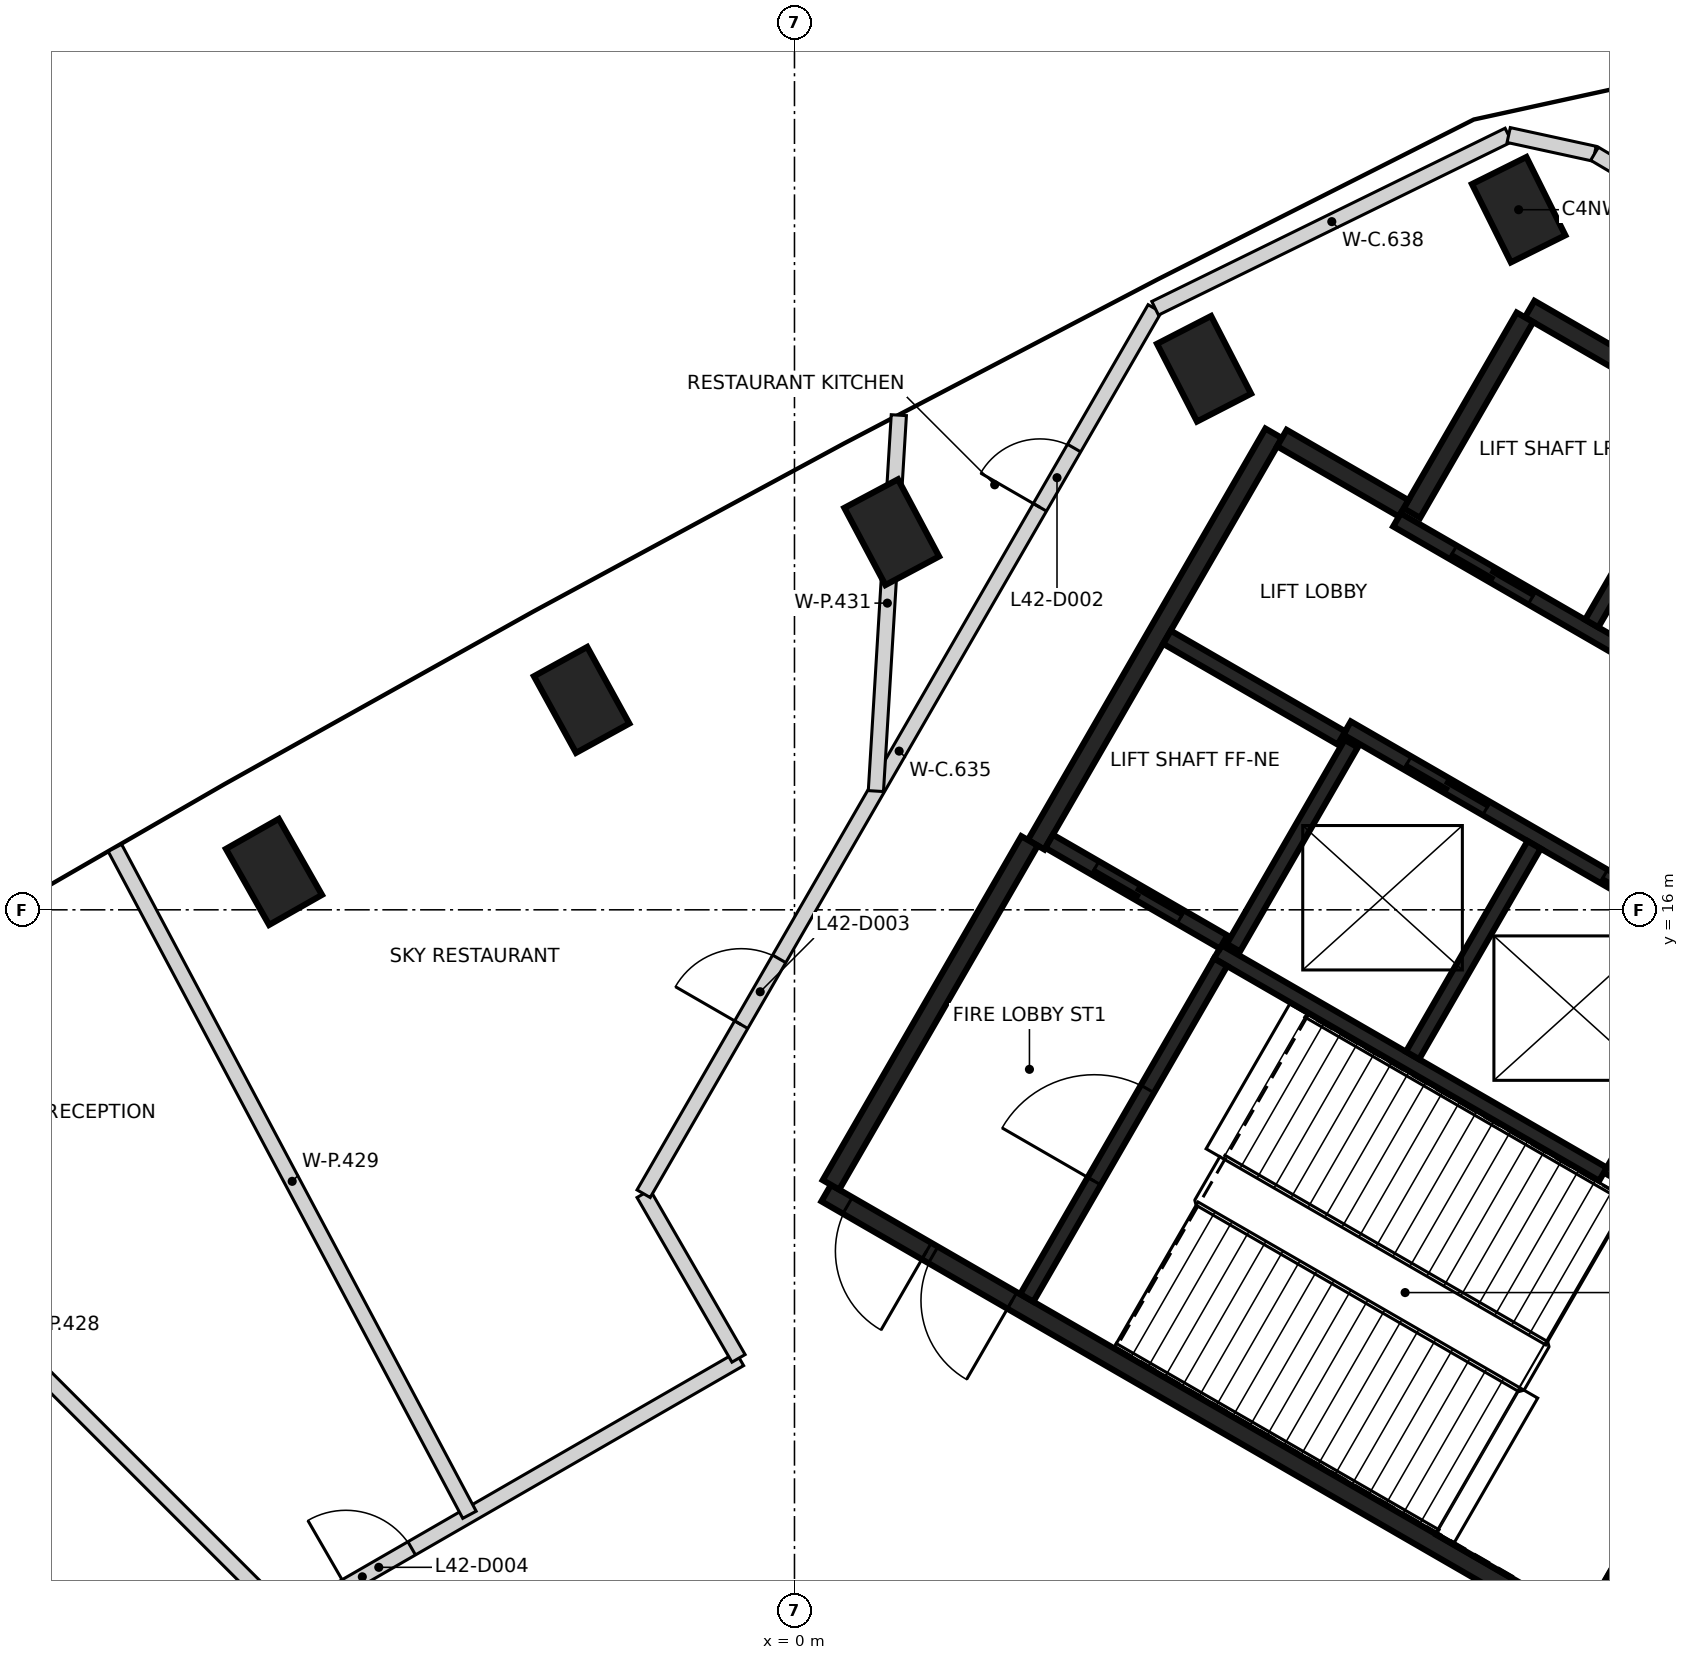
"""IFC4 building model, lengths in metres.
Left out: names, types, materials, properties, quantities, classifications, styles, units other than length and angle.
Written with IfcOpenShell. Run it as: python <this file> out.ifc"""

import sys

from ifc_helpers import new_model, si_unit, direction, frame, frame_2d, origin, origin_2d, place, context, subcontext, project, spatial, rectangle, extrude, element, fill, save


model = new_model("IFC4")
c1 = context("Model", 3, precision=1e-05, world=origin(), true_north=direction((0.0, 1.0)))
c2 = subcontext(c1, "Body", "Model", "MODEL_VIEW")
j1 = project(units=[si_unit("LENGTHUNIT", "METRE"), si_unit("PLANEANGLEUNIT", "RADIAN")], contexts=[c1])
p1 = place(None, origin())
s1 = spatial("IfcSite", under=j1, at=p1, CompositionType="ELEMENT")
p2 = place(p1, origin())
s2 = spatial("IfcBuilding", under=s1, at=p2, CompositionType="ELEMENT")
p3 = place(p2, frame((0.0, 0.0, 169.6)))
s3 = spatial("IfcBuildingStorey", under=s2, at=p3, CompositionType="ELEMENT", Elevation=169.6)
for number, where, z_axis, x_axis in (
    (1, (9.527, 25.211, -0.35), (0.0, 0.0, 1.0), (-0.445, 0.895, 0.0)),
    (2, (5.388, 23.118, -0.35), (0.0, 0.0, 1.0), (-0.458, 0.889, 0.0)),
    (3, (1.279, 20.968, -0.35), (0.0, 0.0, 1.0), (-0.47, 0.883, 0.0)),
    (4, (-2.8, 18.762, -0.35), (0.0, 0.0, 1.0), (-0.482, 0.876, 0.0)),
    (5, (-6.848, 16.499, -0.35), (0.0, 0.0, 1.0), (-0.494, 0.87, 0.0)),
):
    element("IfcColumn", number, at=place(p3, frame(where, z_axis=z_axis, x_axis=x_axis)), inside=s3, PredefinedType="COLUMN", context=c2, shape_type="SweptSolid", body=[
        extrude(rectangle(XDim=1.15, YDim=0.8, at=origin_2d()), origin(), (0.0, 0.0, 1.0), 6.0),
    ])
p4 = place(p3, frame((10.42, 6.498, 0.0), z_axis=(0.0, 0.0, 1.0), x_axis=(-0.866021906294, 0.500006057782, 0.0)))
e6 = element("IfcWall", 6, at=p4, inside=s3, PredefinedType="SHEAR", context=c2, shape_type="SweptSolid", body=[
    extrude(rectangle(XDim=11.55, YDim=0.25, at=frame_2d((5.775, 0.0))), origin(), (0.0, 0.0, 1.0), 5.65),
])
p5 = place(p4, frame((10.025, 0.0, 0.0)))
e7 = element("IfcOpeningElement", 7, at=p5, cuts=e6, PredefinedType="OPENING", context=c2, shape_type="SweptSolid", body=[
    extrude(rectangle(XDim=1.2, YDim=2.1, at=frame_2d((0.6, 1.05))), frame((0.0, 0.135, 0.0), z_axis=(0.0, -1.0, 0.0), x_axis=(1.0, 0.0, 0.0)), (0.0, 0.0, 1.0), 0.27),
])
p6 = place(p4, frame((8.725, 0.0, 0.0)))
e8 = element("IfcOpeningElement", 8, at=p6, cuts=e6, PredefinedType="OPENING", context=c2, shape_type="SweptSolid", body=[
    extrude(rectangle(XDim=1.2, YDim=2.1, at=frame_2d((0.6, 1.05))), frame((0.0, 0.135, 0.0), z_axis=(0.0, -1.0, 0.0), x_axis=(1.0, 0.0, 0.0)), (0.0, 0.0, 1.0), 0.27),
])
p7 = place(p3, frame((3.179, 16.856, 0.0), z_axis=(0.0, 0.0, 1.0), x_axis=(0.500004234368, 0.866022959057, 0.0)))
e9 = element("IfcWall", 9, at=p7, inside=s3, PredefinedType="SHEAR", context=c2, shape_type="SweptSolid", body=[
    extrude(rectangle(XDim=6.25, YDim=0.25, at=frame_2d((3.125, 0.0))), origin(), (0.0, 0.0, 1.0), 5.65),
])
p8 = place(p3, frame((9.673, 23.903, 0.0), z_axis=(0.0, 0.0, 1.0), x_axis=(0.86603616409, -0.499981362141, 0.0)))
e10 = element("IfcWall", 10, at=p8, inside=s3, PredefinedType="SHEAR", context=c2, shape_type="SweptSolid", body=[
    extrude(rectangle(XDim=5.85, YDim=0.25, at=frame_2d((2.925, 0.0))), origin(), (0.0, 0.0, 1.0), 5.65),
])
p9 = place(p3, frame((0.48, 12.381, 0.0), z_axis=(0.0, 0.0, 1.0), x_axis=(0.49999885962, 0.866026062182, 0.0)))
e11 = element("IfcWall", 11, at=p9, inside=s3, PredefinedType="SHEAR", context=c2, shape_type="SweptSolid", body=[
    extrude(rectangle(XDim=5.225, YDim=0.25, at=frame_2d((2.612, 0.0))), origin(), (0.0, 0.0, 1.0), 5.65),
])
p10 = place(p3, frame((13.238, 11.378, 0.0), z_axis=(0.0, 0.0, 1.0), x_axis=(-0.500008851346, -0.866020293397, 0.0)))
e12 = element("IfcWall", 12, at=p10, inside=s3, PredefinedType="SHEAR", context=c2, shape_type="SweptSolid", body=[
    extrude(rectangle(XDim=5.51, YDim=0.25, at=frame_2d((2.755, 0.0))), origin(), (0.0, 0.0, 1.0), 5.65),
])
p11 = place(p3, frame((12.357, 15.252, 0.0), z_axis=(0.0, 0.0, 1.0), x_axis=(-0.500028443584, -0.866008981251, 0.0)))
e13 = element("IfcWall", 13, at=p11, inside=s3, PredefinedType="SHEAR", context=c2, shape_type="SweptSolid", body=[
    extrude(rectangle(XDim=3.2, YDim=0.25, at=frame_2d((1.6, 0.0))), origin(), (0.0, 0.0, 1.0), 5.65),
])
p12 = place(p3, frame((8.123, 21.219, 0.0), z_axis=(0.0, 0.0, 1.0), x_axis=(0.499987686533, 0.866032512851, 0.0)))
e14 = element("IfcWall", 14, at=p12, inside=s3, PredefinedType="SHEAR", context=c2, shape_type="SweptSolid", body=[
    extrude(rectangle(XDim=2.975, YDim=0.25, at=frame_2d((1.487, 0.0))), origin(), (0.0, 0.0, 1.0), 5.65),
])
p13 = place(p3, frame((6.413, 22.206, 0.0), z_axis=(0.0, 0.0, 1.0), x_axis=(0.866016279763, -0.500015802937, 0.0)))
e15 = element("IfcWall", 15, at=p13, inside=s3, PredefinedType="SHEAR", context=c2, shape_type="SweptSolid", body=[
    extrude(rectangle(XDim=1.849, YDim=0.25, at=frame_2d((0.925, 0.0))), origin(), (0.0, 0.0, 1.0), 5.65),
])
p14 = place(p3, frame((13.21, 18.08, 0.0), z_axis=(0.0, 0.0, 1.0), x_axis=(-0.866030299012, 0.499991521122, 0.0)))
e16 = element("IfcWall", 16, at=p14, inside=s3, PredefinedType="SHEAR", context=c2, shape_type="SweptSolid", body=[
    extrude(rectangle(XDim=6.1, YDim=0.2, at=frame_2d((3.05, 0.0))), origin(), (0.0, 0.0, 1.0), 5.65),
])
p15 = place(p14, frame((1.0, 0.0, 0.0)))
e17 = element("IfcOpeningElement", 17, at=p15, cuts=e16, PredefinedType="OPENING", context=c2, shape_type="SweptSolid", body=[
    extrude(rectangle(XDim=1.2, YDim=2.1, at=frame_2d((0.6, 1.05))), frame((0.0, 0.11, 0.0), z_axis=(0.0, -1.0, 0.0), x_axis=(1.0, 0.0, 0.0)), (0.0, 0.0, 1.0), 0.22),
])
p16 = place(p14, frame((4.05, 0.0, 0.0)))
e18 = element("IfcOpeningElement", 18, at=p16, cuts=e16, PredefinedType="OPENING", context=c2, shape_type="SweptSolid", body=[
    extrude(rectangle(XDim=1.2, YDim=2.1, at=frame_2d((0.6, 1.05))), frame((0.0, 0.11, 0.0), z_axis=(0.0, -1.0, 0.0), x_axis=(1.0, 0.0, 0.0)), (0.0, 0.0, 1.0), 0.22),
])
p17 = place(p3, frame((12.552, 15.342, 0.0), z_axis=(0.0, 0.0, 1.0), x_axis=(-0.866030299012, 0.499991521122, 0.0)))
e19 = element("IfcWall", 19, at=p17, inside=s3, PredefinedType="SHEAR", context=c2, shape_type="SweptSolid", body=[
    extrude(rectangle(XDim=6.1, YDim=0.2, at=frame_2d((3.05, 0.0))), origin(), (0.0, 0.0, 1.0), 5.65),
])
p18 = place(p17, frame((1.0, 0.0, 0.0)))
e20 = element("IfcOpeningElement", 20, at=p18, cuts=e19, PredefinedType="OPENING", context=c2, shape_type="SweptSolid", body=[
    extrude(rectangle(XDim=1.2, YDim=2.1, at=frame_2d((0.6, 1.05))), frame((0.0, 0.11, 0.0), z_axis=(0.0, -1.0, 0.0), x_axis=(1.0, 0.0, 0.0)), (0.0, 0.0, 1.0), 0.22),
])
p19 = place(p17, frame((3.982, 0.0, 0.0)))
e21 = element("IfcOpeningElement", 21, at=p19, cuts=e19, PredefinedType="OPENING", context=c2, shape_type="SweptSolid", body=[
    extrude(rectangle(XDim=1.2, YDim=2.1, at=frame_2d((0.6, 1.05))), frame((0.0, 0.11, 0.0), z_axis=(0.0, -1.0, 0.0), x_axis=(1.0, 0.0, 0.0)), (0.0, 0.0, 1.0), 0.22),
])
p20 = place(p3, frame((10.636, 12.521, 0.0), z_axis=(0.0, 0.0, 1.0), x_axis=(-0.866013252188, 0.500021046592, 0.0)))
e22 = element("IfcWall", 22, at=p20, inside=s3, PredefinedType="SHEAR", context=c2, shape_type="SweptSolid", body=[
    extrude(rectangle(XDim=5.851, YDim=0.2, at=frame_2d((2.925, 0.0))), origin(), (0.0, 0.0, 1.0), 5.65),
])
p21 = place(p3, frame((3.057, 10.895, 0.0), z_axis=(0.0, 0.0, 1.0), x_axis=(0.500027839223, 0.866009330205, 0.0)))
e23 = element("IfcWall", 23, at=p21, inside=s3, PredefinedType="SHEAR", context=c2, shape_type="SweptSolid", body=[
    extrude(rectangle(XDim=5.098, YDim=0.2, at=frame_2d((2.549, 0.0))), origin(), (0.0, 0.0, 1.0), 5.65),
])
p22 = place(p21, frame((1.774, 0.0, 0.0)))
e24 = element("IfcOpeningElement", 24, at=p22, cuts=e23, PredefinedType="OPENING", context=c2, shape_type="SweptSolid", body=[
    extrude(rectangle(XDim=1.4, YDim=2.1, at=frame_2d((0.7, 1.05))), frame((0.0, 0.11, 0.0), z_axis=(0.0, -1.0, 0.0), x_axis=(1.0, 0.0, 0.0)), (0.0, 0.0, 1.0), 0.22),
])
p23 = place(p3, frame((8.132, 14.084, 0.0), z_axis=(0.0, 0.0, 1.0), x_axis=(0.500030834389, 0.86600760081, 0.0)))
e25 = element("IfcWall", 25, at=p23, inside=s3, PredefinedType="SHEAR", context=c2, shape_type="SweptSolid", body=[
    extrude(rectangle(XDim=3.198, YDim=0.2, at=frame_2d((1.599, 0.0))), origin(), (0.0, 0.0, 1.0), 5.65),
])
p24 = place(p3, frame((10.489, 19.767, 0.0), z_axis=(0.0, 0.0, 1.0), x_axis=(0.499946628782, 0.866056215479, 0.0)))
e26 = element("IfcWall", 26, at=p24, inside=s3, PredefinedType="SHEAR", context=c2, shape_type="SweptSolid", body=[
    extrude(rectangle(XDim=3.048, YDim=0.2, at=frame_2d((1.524, 0.0))), origin(), (0.0, 0.0, 1.0), 5.65),
])
p25 = place(p3, frame((7.324, 18.187, 0.0), z_axis=(0.0, 0.0, 1.0), x_axis=(-0.499967891604, -0.866043940782, 0.0)))
e27 = element("IfcWall", 27, at=p25, inside=s3, PredefinedType="SHEAR", context=c2, shape_type="SweptSolid", body=[
    extrude(rectangle(XDim=3.1, YDim=0.2, at=frame_2d((1.55, 0.0))), origin(), (0.0, 0.0, 1.0), 5.65),
])
p26 = place(p3, frame((5.646, 15.576, 0.0), z_axis=(0.0, 0.0, 1.0), x_axis=(-0.866018407898, 0.500012117035, 0.0)))
e28 = element("IfcWall", 28, at=p26, inside=s3, PredefinedType="SHEAR", context=c2, shape_type="SweptSolid", body=[
    extrude(rectangle(XDim=2.651, YDim=0.2, at=frame_2d((1.325, 0.0))), origin(), (0.0, 0.0, 1.0), 5.65),
])
p27 = place(p26, frame((0.652, 0.0, 0.0)))
e29 = element("IfcOpeningElement", 29, at=p27, cuts=e28, PredefinedType="OPENING", context=c2, shape_type="SweptSolid", body=[
    extrude(rectangle(XDim=1.3, YDim=2.1, at=frame_2d((0.65, 1.05))), frame((0.0, 0.11, 0.0), z_axis=(0.0, -1.0, 0.0), x_axis=(1.0, 0.0, 0.0)), (0.0, 0.0, 1.0), 0.22),
])
p28 = place(p3, frame((7.196, 18.26, 0.0), z_axis=(0.0, 0.0, 1.0), x_axis=(-0.866018407898, 0.500012117035, 0.0)))
e30 = element("IfcWall", 30, at=p28, inside=s3, PredefinedType="SHEAR", context=c2, shape_type="SweptSolid", body=[
    extrude(rectangle(XDim=2.651, YDim=0.2, at=frame_2d((1.325, 0.0))), origin(), (0.0, 0.0, 1.0), 5.65),
])
p29 = place(p3, frame((-10.652, 4.36, 0.0), z_axis=(0.0, 0.0, 1.0), x_axis=(0.866215711467, 0.499670232461, 0.0)))
e31 = element("IfcWall", 31, at=p29, inside=s3, PredefinedType="PARTITIONING", context=c2, shape_type="SweptSolid", body=[
    extrude(rectangle(XDim=11.468, YDim=0.2, at=frame_2d((5.734, 0.0))), origin(), (0.0, 0.0, 1.0), 5.65),
])
p30 = place(p29, frame((5.484, 0.0, 0.0)))
e32 = element("IfcOpeningElement", 32, at=p30, cuts=e31, PredefinedType="OPENING", context=c2, shape_type="SweptSolid", body=[
    extrude(rectangle(XDim=1.0, YDim=2.1, at=frame_2d((0.5, 1.05))), frame((0.0, 0.11, 0.0), z_axis=(0.0, -1.0, 0.0), x_axis=(1.0, 0.0, 0.0)), (0.0, 0.0, 1.0), 0.22),
])
p31 = place(p29, frame((1.775, 0.0, 0.0)))
e33 = element("IfcOpeningElement", 33, at=p31, cuts=e31, PredefinedType="OPENING", context=c2, shape_type="SweptSolid", body=[
    extrude(rectangle(XDim=1.0, YDim=2.1, at=frame_2d((0.5, 1.05))), frame((0.0, 0.11, 0.0), z_axis=(0.0, -1.0, 0.0), x_axis=(1.0, 0.0, 0.0)), (0.0, 0.0, 1.0), 0.22),
])
p32 = place(p3, frame((-1.985, 12.265, 0.0), z_axis=(0.0, 0.0, 1.0), x_axis=(0.499584369631, -0.866265235145, 0.0)))
e34 = element("IfcWall", 34, at=p32, inside=s3, PredefinedType="PARTITIONING", context=c2, shape_type="SweptSolid", body=[
    extrude(rectangle(XDim=2.5, YDim=0.2, at=frame_2d((1.25, 0.0))), origin(), (0.0, 0.0, 1.0), 5.65),
])
p33 = place(p3, frame((-1.985, 12.265, 0.0), z_axis=(0.0, 0.0, 1.0), x_axis=(0.500003233276, 0.866023537044, 0.0)))
e35 = element("IfcWall", 35, at=p33, inside=s3, PredefinedType="PARTITIONING", context=c2, shape_type="SweptSolid", body=[
    extrude(rectangle(XDim=13.448, YDim=0.2, at=frame_2d((6.724, 0.0))), origin(), (0.0, 0.0, 1.0), 4.75),
])
p34 = place(p33, frame((10.427, 0.0, 0.0)))
e36 = element("IfcOpeningElement", 36, at=p34, cuts=e35, PredefinedType="OPENING", context=c2, shape_type="SweptSolid", body=[
    extrude(rectangle(XDim=0.9, YDim=2.1, at=frame_2d((0.45, 1.05))), frame((0.0, 0.11, 0.0), z_axis=(0.0, -1.0, 0.0), x_axis=(1.0, 0.0, 0.0)), (0.0, 0.0, 1.0), 0.22),
])
p35 = place(p33, frame((2.568, 0.0, 0.0)))
e37 = element("IfcOpeningElement", 37, at=p35, cuts=e35, PredefinedType="OPENING", context=c2, shape_type="SweptSolid", body=[
    extrude(rectangle(XDim=1.0, YDim=2.1, at=frame_2d((0.5, 1.05))), frame((0.0, 0.11, 0.0), z_axis=(0.0, -1.0, 0.0), x_axis=(1.0, 0.0, 0.0)), (0.0, 0.0, 1.0), 0.22),
])
p36 = place(p3, frame((4.745, 23.914, 0.0), z_axis=(0.0, 0.0, 1.0), x_axis=(0.897871376736, 0.44025786857, 0.0)))
e38 = element("IfcWall", 38, at=p36, inside=s3, PredefinedType="PARTITIONING", context=c2, shape_type="SweptSolid", body=[
    extrude(rectangle(XDim=5.177, YDim=0.2, at=frame_2d((2.588, 0.0))), origin(), (0.0, 0.0, 1.0), 5.65),
])
p37 = place(p3, frame((9.396, 26.193, 0.0), z_axis=(0.0, 0.0, 1.0), x_axis=(0.977092447053, -0.212815295296, 0.0)))
e39 = element("IfcWall", 39, at=p37, inside=s3, PredefinedType="PARTITIONING", context=c2, shape_type="SweptSolid", body=[
    extrude(rectangle(XDim=1.156, YDim=0.2, at=frame_2d((0.578, 0.0))), origin(), (0.0, 0.0, 1.0), 5.65),
])
p38 = place(p3, frame((10.526, 25.947, 0.0), z_axis=(0.0, 0.0, 1.0), x_axis=(0.860134432283, -0.510067405742, 0.0)))
e40 = element("IfcWall", 40, at=p38, inside=s3, PredefinedType="PARTITIONING", context=c2, shape_type="SweptSolid", body=[
    extrude(rectangle(XDim=7.146, YDim=0.2, at=frame_2d((3.573, 0.0))), origin(), (0.0, 0.0, 1.0), 4.75),
])
p39 = place(p3, frame((-13.905, 13.905, 0.0), z_axis=(0.0, 0.0, 1.0), x_axis=(0.707106781187, -0.707106781187, 0.0)))
e41 = element("IfcWall", 41, at=p39, inside=s3, PredefinedType="PARTITIONING", context=c2, shape_type="SweptSolid", body=[
    extrude(rectangle(XDim=10.241, YDim=0.2, at=frame_2d((5.121, 0.0))), origin(), (0.0, 0.0, 1.0), 4.75),
])
p40 = place(p3, frame((-8.941, 16.815, 0.0), z_axis=(0.0, 0.0, 1.0), x_axis=(0.469441422689, -0.882963617973, 0.0)))
e42 = element("IfcWall", 42, at=p40, inside=s3, PredefinedType="PARTITIONING", context=c2, shape_type="SweptSolid", body=[
    extrude(rectangle(XDim=9.937, YDim=0.2, at=frame_2d((4.969, 0.0))), origin(), (0.0, 0.0, 1.0), 4.75),
])
p41 = place(p3, frame((1.071, 17.562, 0.0), z_axis=(0.0, 0.0, 1.0), x_axis=(0.060902681742, 0.99814370877, 0.0)))
e43 = element("IfcWall", 43, at=p41, inside=s3, PredefinedType="PARTITIONING", context=c2, shape_type="SweptSolid", body=[
    extrude(rectangle(XDim=4.955, YDim=0.2, at=frame_2d((2.478, 0.0))), origin(), (0.0, 0.0, 1.0), 5.65),
])
p42 = place(p27, origin())
e44 = element("IfcDoor", 44, at=p42, inside=s3, OperationType="SLIDING_TO_LEFT", PredefinedType="DOOR", context=c2, shape_type="SweptSolid", body=[
    extrude(rectangle(XDim=1.3, YDim=2.1, at=frame_2d((0.65, 1.05))), frame((0.0, 0.025, 0.0), z_axis=(0.0, -1.0, 0.0), x_axis=(1.0, 0.0, 0.0)), (0.0, 0.0, 1.0), 0.05),
])
fill(e29, e44)
p43 = place(p18, origin())
e45 = element("IfcDoor", 45, at=p43, inside=s3, OperationType="DOUBLE_DOOR_SLIDING", PredefinedType="DOOR", context=c2, shape_type="SweptSolid", body=[
    extrude(rectangle(XDim=1.2, YDim=2.1, at=frame_2d((0.6, 1.05))), frame((0.0, 0.025, 0.0), z_axis=(0.0, -1.0, 0.0), x_axis=(1.0, 0.0, 0.0)), (0.0, 0.0, 1.0), 0.05),
])
fill(e20, e45)
p44 = place(p19, origin())
e46 = element("IfcDoor", 46, at=p44, inside=s3, OperationType="DOUBLE_DOOR_SLIDING", PredefinedType="DOOR", context=c2, shape_type="SweptSolid", body=[
    extrude(rectangle(XDim=1.2, YDim=2.1, at=frame_2d((0.6, 1.05))), frame((0.0, 0.025, 0.0), z_axis=(0.0, -1.0, 0.0), x_axis=(1.0, 0.0, 0.0)), (0.0, 0.0, 1.0), 0.05),
])
fill(e21, e46)
p45 = place(p16, origin())
e47 = element("IfcDoor", 47, at=p45, inside=s3, OperationType="DOUBLE_DOOR_SLIDING", PredefinedType="DOOR", context=c2, shape_type="SweptSolid", body=[
    extrude(rectangle(XDim=1.2, YDim=2.1, at=frame_2d((0.6, 1.05))), frame((0.0, 0.025, 0.0), z_axis=(0.0, -1.0, 0.0), x_axis=(1.0, 0.0, 0.0)), (0.0, 0.0, 1.0), 0.05),
])
fill(e18, e47)
p46 = place(p5, origin())
e48 = element("IfcDoor", 48, at=p46, inside=s3, OperationType="SINGLE_SWING_LEFT", PredefinedType="DOOR", context=c2, shape_type="SweptSolid", body=[
    extrude(rectangle(XDim=1.2, YDim=2.1, at=frame_2d((0.6, 1.05))), frame((0.0, 0.025, 0.0), z_axis=(0.0, -1.0, 0.0), x_axis=(1.0, 0.0, 0.0)), (0.0, 0.0, 1.0), 0.05),
])
fill(e7, e48)
p47 = place(p6, origin())
e49 = element("IfcDoor", 49, at=p47, inside=s3, OperationType="SINGLE_SWING_RIGHT", PredefinedType="DOOR", context=c2, shape_type="SweptSolid", body=[
    extrude(rectangle(XDim=1.2, YDim=2.1, at=frame_2d((0.6, 1.05))), frame((0.0, 0.025, 0.0), z_axis=(0.0, -1.0, 0.0), x_axis=(1.0, 0.0, 0.0)), (0.0, 0.0, 1.0), 0.05),
])
fill(e8, e49)
p48 = place(p22, origin())
e50 = element("IfcDoor", 50, at=p48, inside=s3, OperationType="SINGLE_SWING_LEFT", PredefinedType="DOOR", context=c2, shape_type="SweptSolid", body=[
    extrude(rectangle(XDim=1.4, YDim=2.1, at=frame_2d((0.7, 1.05))), frame((0.0, 0.025, 0.0), z_axis=(0.0, -1.0, 0.0), x_axis=(1.0, 0.0, 0.0)), (0.0, 0.0, 1.0), 0.05),
])
fill(e24, e50)
p49 = place(p34, origin())
e51 = element("IfcDoor", 51, at=p49, inside=s3, OperationType="SINGLE_SWING_LEFT", PredefinedType="DOOR", context=c2, shape_type="SweptSolid", body=[
    extrude(rectangle(XDim=0.9, YDim=2.1, at=frame_2d((0.45, 1.05))), frame((0.0, 0.025, 0.0), z_axis=(0.0, -1.0, 0.0), x_axis=(1.0, 0.0, 0.0)), (0.0, 0.0, 1.0), 0.05),
])
fill(e36, e51)
p50 = place(p35, origin())
e52 = element("IfcDoor", 52, at=p50, inside=s3, OperationType="SINGLE_SWING_LEFT", PredefinedType="DOOR", context=c2, shape_type="SweptSolid", body=[
    extrude(rectangle(XDim=1.0, YDim=2.1, at=frame_2d((0.5, 1.05))), frame((0.0, 0.025, 0.0), z_axis=(0.0, -1.0, 0.0), x_axis=(1.0, 0.0, 0.0)), (0.0, 0.0, 1.0), 0.05),
])
fill(e37, e52)
p51 = place(p30, origin())
e53 = element("IfcDoor", 53, at=p51, inside=s3, OperationType="SINGLE_SWING_LEFT", PredefinedType="DOOR", context=c2, shape_type="SweptSolid", body=[
    extrude(rectangle(XDim=1.0, YDim=2.1, at=frame_2d((0.5, 1.05))), frame((0.0, 0.025, 0.0), z_axis=(0.0, -1.0, 0.0), x_axis=(1.0, 0.0, 0.0)), (0.0, 0.0, 1.0), 0.05),
])
fill(e32, e53)
save(model, sys.argv[1])
